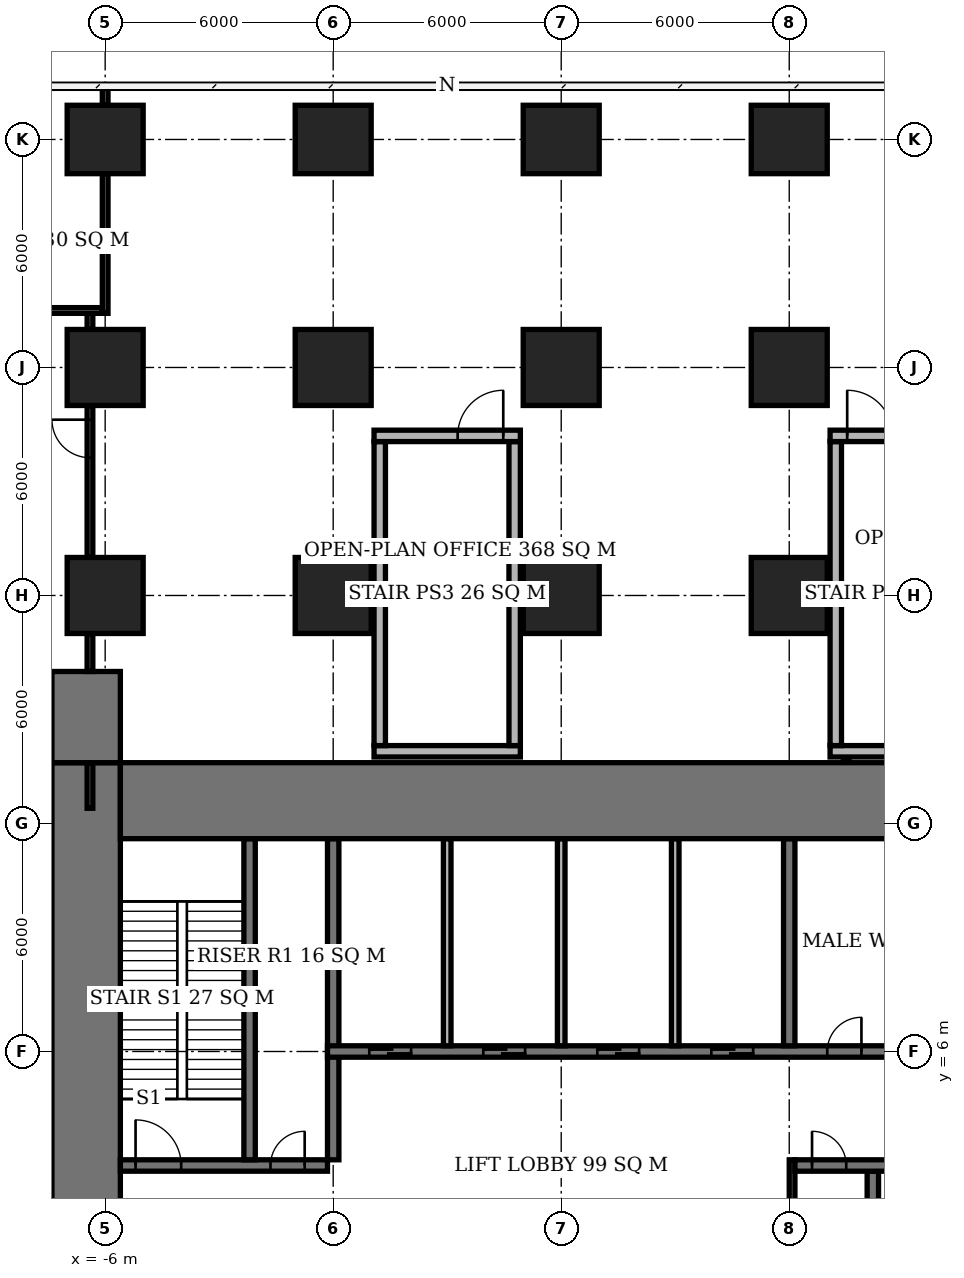
"""IFC4 building model, lengths in metres.
Left out: names, types, materials, properties, quantities, classifications, styles, units other than length and angle.
Written with IfcOpenShell. Run it as: python <this file> out.ifc"""

import sys

from ifc_helpers import new_model, si_unit, direction, frame, frame_2d, origin, origin_2d, place, context, subcontext, project, spatial, rectangle, extrude, element, fill, save


model = new_model("IFC4")
c1 = context("Model", 3, precision=1e-05, world=origin(), true_north=direction((0.0, 1.0)))
c2 = subcontext(c1, "Body", "Model", "MODEL_VIEW")
j1 = project(units=[si_unit("LENGTHUNIT", "METRE"), si_unit("PLANEANGLEUNIT", "RADIAN")], contexts=[c1])
p1 = place(None, origin())
s1 = spatial("IfcSite", under=j1, at=p1, CompositionType="ELEMENT")
p2 = place(p1, origin())
s2 = spatial("IfcBuilding", under=s1, at=p2, CompositionType="ELEMENT")
p3 = place(p2, frame((0.0, 0.0, 11.0)))
s3 = spatial("IfcBuildingStorey", under=s2, at=p3, CompositionType="ELEMENT", Elevation=11.0)
for number, where, z_axis, x_axis in (
    (1, (-6.0, 18.0, 0.0), (0.0, 0.0, 1.0), (1.0, 0.0, 0.0)),
    (2, (-6.0, 24.0, 0.0), (0.0, 0.0, 1.0), (1.0, 0.0, 0.0)),
):
    element("IfcColumn", number, at=place(p3, frame(where, z_axis=z_axis, x_axis=x_axis)), inside=s3, PredefinedType="COLUMN", context=c2, shape_type="SweptSolid", body=[
        extrude(rectangle(XDim=2.0, YDim=2.0, at=origin_2d()), origin(), (0.0, 0.0, 1.0), 7.2),
    ])
p4 = place(p3, frame((-6.0, 30.0, 0.0), z_axis=(0.0, 0.0, 1.0), x_axis=(1.0, 0.0, 0.0)))
e3 = element("IfcColumn", 3, at=p4, inside=s3, PredefinedType="COLUMN", context=c2, shape_type="SweptSolid", body=[
    extrude(rectangle(XDim=2.0, YDim=1.8, at=origin_2d()), origin(), (0.0, 0.0, 1.0), 7.2),
])
for number, where, z_axis, x_axis in (
    (4, (0.0, 18.0, 0.0), (0.0, 0.0, 1.0), (1.0, 0.0, 0.0)),
    (5, (0.0, 24.0, 0.0), (0.0, 0.0, 1.0), (1.0, 0.0, 0.0)),
):
    element("IfcColumn", number, at=place(p3, frame(where, z_axis=z_axis, x_axis=x_axis)), inside=s3, PredefinedType="COLUMN", context=c2, shape_type="SweptSolid", body=[
        extrude(rectangle(XDim=2.0, YDim=2.0, at=origin_2d()), origin(), (0.0, 0.0, 1.0), 7.2),
    ])
p5 = place(p3, frame((0.0, 30.0, 0.0), z_axis=(0.0, 0.0, 1.0), x_axis=(1.0, 0.0, 0.0)))
e6 = element("IfcColumn", 6, at=p5, inside=s3, PredefinedType="COLUMN", context=c2, shape_type="SweptSolid", body=[
    extrude(rectangle(XDim=2.0, YDim=1.8, at=origin_2d()), origin(), (0.0, 0.0, 1.0), 7.2),
])
for number, where, z_axis, x_axis in (
    (7, (6.0, 18.0, 0.0), (0.0, 0.0, 1.0), (1.0, 0.0, 0.0)),
    (8, (6.0, 24.0, 0.0), (0.0, 0.0, 1.0), (1.0, 0.0, 0.0)),
):
    element("IfcColumn", number, at=place(p3, frame(where, z_axis=z_axis, x_axis=x_axis)), inside=s3, PredefinedType="COLUMN", context=c2, shape_type="SweptSolid", body=[
        extrude(rectangle(XDim=2.0, YDim=2.0, at=origin_2d()), origin(), (0.0, 0.0, 1.0), 7.2),
    ])
p6 = place(p3, frame((6.0, 30.0, 0.0), z_axis=(0.0, 0.0, 1.0), x_axis=(1.0, 0.0, 0.0)))
e9 = element("IfcColumn", 9, at=p6, inside=s3, PredefinedType="COLUMN", context=c2, shape_type="SweptSolid", body=[
    extrude(rectangle(XDim=2.0, YDim=1.8, at=origin_2d()), origin(), (0.0, 0.0, 1.0), 7.2),
])
for number, where, z_axis, x_axis in (
    (10, (12.0, 18.0, 0.0), (0.0, 0.0, 1.0), (1.0, 0.0, 0.0)),
    (11, (12.0, 24.0, 0.0), (0.0, 0.0, 1.0), (1.0, 0.0, 0.0)),
):
    element("IfcColumn", number, at=place(p3, frame(where, z_axis=z_axis, x_axis=x_axis)), inside=s3, PredefinedType="COLUMN", context=c2, shape_type="SweptSolid", body=[
        extrude(rectangle(XDim=2.0, YDim=2.0, at=origin_2d()), origin(), (0.0, 0.0, 1.0), 7.2),
    ])
p7 = place(p3, frame((12.0, 30.0, 0.0), z_axis=(0.0, 0.0, 1.0), x_axis=(1.0, 0.0, 0.0)))
e12 = element("IfcColumn", 12, at=p7, inside=s3, PredefinedType="COLUMN", context=c2, shape_type="SweptSolid", body=[
    extrude(rectangle(XDim=2.0, YDim=1.8, at=origin_2d()), origin(), (0.0, 0.0, 1.0), 7.2),
])
p8 = place(p3, frame((-5.6, 12.6, 0.0), z_axis=(0.0, 0.0, 1.0), x_axis=(1.0, 0.0, 0.0)))
e13 = element("IfcWall", 13, at=p8, inside=s3, PredefinedType="SHEAR", context=c2, shape_type="SweptSolid", body=[
    extrude(rectangle(XDim=23.2, YDim=2.0, at=frame_2d((11.6, 0.0))), origin(), (0.0, 0.0, 1.0), 7.2),
])
p9 = place(p3, frame((-6.5, -7.6, 0.0), z_axis=(0.0, 0.0, 1.0), x_axis=(0.0, 1.0, 0.0)))
e14 = element("IfcWall", 14, at=p9, inside=s3, PredefinedType="SHEAR", context=c2, shape_type="SweptSolid", body=[
    extrude(rectangle(XDim=21.2, YDim=1.8, at=frame_2d((10.6, 0.0))), origin(), (0.0, 0.0, 1.0), 7.2),
])
p10 = place(p9, frame((7.8, 0.0, 0.0)))
e15 = element("IfcOpeningElement", 15, at=p10, cuts=e14, PredefinedType="OPENING", context=c2, shape_type="SweptSolid", body=[
    extrude(rectangle(XDim=1.8, YDim=2.4, at=frame_2d((0.9, 1.2))), frame((0.0, 0.91, 0.0), z_axis=(0.0, -1.0, 0.0), x_axis=(1.0, 0.0, 0.0)), (0.0, 0.0, 1.0), 1.82),
])
p11 = place(p3, frame((-6.5, 13.6, 0.0), z_axis=(0.0, 0.0, 1.0), x_axis=(0.0, 1.0, 0.0)))
e16 = element("IfcWall", 16, at=p11, inside=s3, PredefinedType="SHEAR", context=c2, shape_type="SweptSolid", body=[
    extrude(rectangle(XDim=2.4, YDim=1.8, at=frame_2d((1.2, 0.0))), origin(), (0.0, 0.0, 1.0), 7.2),
])
p12 = place(p3, frame((-5.6, 3.0, 0.0), z_axis=(0.0, 0.0, 1.0), x_axis=(1.0, 0.0, 0.0)))
e17 = element("IfcWall", 17, at=p12, inside=s3, PredefinedType="SHEAR", context=c2, shape_type="SweptSolid", body=[
    extrude(rectangle(XDim=5.45, YDim=0.3, at=frame_2d((2.725, 0.0))), origin(), (0.0, 0.0, 1.0), 7.2),
])
p13 = place(p12, frame((0.4, 0.0, 0.0)))
e18 = element("IfcOpeningElement", 18, at=p13, cuts=e17, PredefinedType="OPENING", context=c2, shape_type="SweptSolid", body=[
    extrude(rectangle(XDim=1.2, YDim=2.1, at=frame_2d((0.6, 1.05))), frame((0.0, 0.16, 0.0), z_axis=(0.0, -1.0, 0.0), x_axis=(1.0, 0.0, 0.0)), (0.0, 0.0, 1.0), 0.32),
])
p14 = place(p12, frame((3.95, 0.0, 0.0)))
e19 = element("IfcOpeningElement", 19, at=p14, cuts=e17, PredefinedType="OPENING", context=c2, shape_type="SweptSolid", body=[
    extrude(rectangle(XDim=0.9, YDim=2.1, at=frame_2d((0.45, 1.05))), frame((0.0, 0.16, 0.0), z_axis=(0.0, -1.0, 0.0), x_axis=(1.0, 0.0, 0.0)), (0.0, 0.0, 1.0), 0.32),
])
p15 = place(p3, frame((12.15, 3.0, 0.0), z_axis=(0.0, 0.0, 1.0), x_axis=(1.0, 0.0, 0.0)))
e20 = element("IfcWall", 20, at=p15, inside=s3, PredefinedType="SHEAR", context=c2, shape_type="SweptSolid", body=[
    extrude(rectangle(XDim=5.45, YDim=0.3, at=frame_2d((2.725, 0.0))), origin(), (0.0, 0.0, 1.0), 7.2),
])
p16 = place(p15, frame((3.25, 0.0, 0.0)))
e21 = element("IfcOpeningElement", 21, at=p16, cuts=e20, PredefinedType="OPENING", context=c2, shape_type="SweptSolid", body=[
    extrude(rectangle(XDim=1.2, YDim=2.1, at=frame_2d((0.6, 1.05))), frame((0.0, 0.16, 0.0), z_axis=(0.0, -1.0, 0.0), x_axis=(1.0, 0.0, 0.0)), (0.0, 0.0, 1.0), 0.32),
])
p17 = place(p15, frame((0.45, 0.0, 0.0)))
e22 = element("IfcOpeningElement", 22, at=p17, cuts=e20, PredefinedType="OPENING", context=c2, shape_type="SweptSolid", body=[
    extrude(rectangle(XDim=0.9, YDim=2.1, at=frame_2d((0.45, 1.05))), frame((0.0, 0.16, 0.0), z_axis=(0.0, -1.0, 0.0), x_axis=(1.0, 0.0, 0.0)), (0.0, 0.0, 1.0), 0.32),
])
p18 = place(p3, frame((-0.15, 6.0, 0.0), z_axis=(0.0, 0.0, 1.0), x_axis=(1.0, 0.0, 0.0)))
e23 = element("IfcWall", 23, at=p18, inside=s3, PredefinedType="SHEAR", context=c2, shape_type="SweptSolid", body=[
    extrude(rectangle(XDim=17.75, YDim=0.3, at=frame_2d((8.875, 0.0))), origin(), (0.0, 0.0, 1.0), 7.2),
])
p19 = place(p18, frame((13.15, 0.0, 0.0)))
e24 = element("IfcOpeningElement", 24, at=p19, cuts=e23, PredefinedType="OPENING", context=c2, shape_type="SweptSolid", body=[
    extrude(rectangle(XDim=0.9, YDim=2.1, at=frame_2d((0.45, 1.05))), frame((0.0, 0.16, 0.0), z_axis=(0.0, -1.0, 0.0), x_axis=(1.0, 0.0, 0.0)), (0.0, 0.0, 1.0), 0.32),
])
p20 = place(p18, frame((1.1, 0.0, 0.0)))
e25 = element("IfcOpeningElement", 25, at=p20, cuts=e23, PredefinedType="OPENING", context=c2, shape_type="SweptSolid", body=[
    extrude(rectangle(XDim=1.1, YDim=2.1, at=frame_2d((0.55, 1.05))), frame((0.0, 0.16, 0.0), z_axis=(0.0, -1.0, 0.0), x_axis=(1.0, 0.0, 0.0)), (0.0, 0.0, 1.0), 0.32),
])
p21 = place(p18, frame((4.1, 0.0, 0.0)))
e26 = element("IfcOpeningElement", 26, at=p21, cuts=e23, PredefinedType="OPENING", context=c2, shape_type="SweptSolid", body=[
    extrude(rectangle(XDim=1.1, YDim=2.1, at=frame_2d((0.55, 1.05))), frame((0.0, 0.16, 0.0), z_axis=(0.0, -1.0, 0.0), x_axis=(1.0, 0.0, 0.0)), (0.0, 0.0, 1.0), 0.32),
])
p22 = place(p18, frame((7.1, 0.0, 0.0)))
e27 = element("IfcOpeningElement", 27, at=p22, cuts=e23, PredefinedType="OPENING", context=c2, shape_type="SweptSolid", body=[
    extrude(rectangle(XDim=1.1, YDim=2.1, at=frame_2d((0.55, 1.05))), frame((0.0, 0.16, 0.0), z_axis=(0.0, -1.0, 0.0), x_axis=(1.0, 0.0, 0.0)), (0.0, 0.0, 1.0), 0.32),
])
p23 = place(p18, frame((10.1, 0.0, 0.0)))
e28 = element("IfcOpeningElement", 28, at=p23, cuts=e23, PredefinedType="OPENING", context=c2, shape_type="SweptSolid", body=[
    extrude(rectangle(XDim=1.1, YDim=2.1, at=frame_2d((0.55, 1.05))), frame((0.0, 0.16, 0.0), z_axis=(0.0, -1.0, 0.0), x_axis=(1.0, 0.0, 0.0)), (0.0, 0.0, 1.0), 0.32),
])
p24 = place(p3, frame((0.0, 3.15, 0.0), z_axis=(0.0, 0.0, 1.0), x_axis=(0.0, 1.0, 0.0)))
e29 = element("IfcWall", 29, at=p24, inside=s3, PredefinedType="SHEAR", context=c2, shape_type="SweptSolid", body=[
    extrude(rectangle(XDim=8.45, YDim=0.3, at=frame_2d((4.225, 0.0))), origin(), (0.0, 0.0, 1.0), 7.2),
])
p25 = place(p3, frame((12.0, 6.15, 0.0), z_axis=(0.0, 0.0, 1.0), x_axis=(0.0, 1.0, 0.0)))
e30 = element("IfcWall", 30, at=p25, inside=s3, PredefinedType="SHEAR", context=c2, shape_type="SweptSolid", body=[
    extrude(rectangle(XDim=5.45, YDim=0.3, at=frame_2d((2.725, 0.0))), origin(), (0.0, 0.0, 1.0), 7.2),
])
for number, where, z_axis, x_axis in (
    (31, (-2.2, 3.15, 0.0), (0.0, 0.0, 1.0), (0.0, 1.0, 0.0)),
    (32, (14.2, -5.6, 0.0), (0.0, 0.0, 1.0), (0.0, 1.0, 0.0)),
):
    element("IfcWall", number, at=place(p3, frame(where, z_axis=z_axis, x_axis=x_axis)), inside=s3, PredefinedType="SHEAR", context=c2, shape_type="SweptSolid", body=[
        extrude(rectangle(XDim=8.45, YDim=0.3, at=frame_2d((4.225, 0.0))), origin(), (0.0, 0.0, 1.0), 7.2),
    ])
for number, where, z_axis, x_axis in (
    (33, (3.0, 6.15, 0.0), (0.0, 0.0, 1.0), (0.0, 1.0, 0.0)),
    (34, (6.0, 6.15, 0.0), (0.0, 0.0, 1.0), (0.0, 1.0, 0.0)),
    (35, (9.0, 6.15, 0.0), (0.0, 0.0, 1.0), (0.0, 1.0, 0.0)),
):
    element("IfcWall", number, at=place(p3, frame(where, z_axis=z_axis, x_axis=x_axis)), inside=s3, PredefinedType="SOLIDWALL", context=c2, shape_type="SweptSolid", body=[
        extrude(rectangle(XDim=5.45, YDim=0.2, at=frame_2d((2.725, 0.0))), origin(), (0.0, 0.0, 1.0), 7.2),
    ])
p26 = place(p3, frame((13.075, 13.9, 0.0), z_axis=(0.0, 0.0, 1.0), x_axis=(1.0, 0.0, 0.0)))
e36 = element("IfcWall", 36, at=p26, inside=s3, PredefinedType="PARTITIONING", context=c2, shape_type="SweptSolid", body=[
    extrude(rectangle(XDim=3.85, YDim=0.3, at=frame_2d((1.925, 0.0))), origin(), (0.0, 0.0, 1.0), 6.95),
])
p27 = place(p3, frame((13.075, 22.2, 0.0), z_axis=(0.0, 0.0, 1.0), x_axis=(1.0, 0.0, 0.0)))
e37 = element("IfcWall", 37, at=p27, inside=s3, PredefinedType="PARTITIONING", context=c2, shape_type="SweptSolid", body=[
    extrude(rectangle(XDim=3.85, YDim=0.3, at=frame_2d((1.925, 0.0))), origin(), (0.0, 0.0, 1.0), 6.95),
])
p28 = place(p27, frame((0.45, 0.0, 0.0)))
e38 = element("IfcOpeningElement", 38, at=p28, cuts=e37, PredefinedType="OPENING", context=c2, shape_type="SweptSolid", body=[
    extrude(rectangle(XDim=1.2, YDim=2.1, at=frame_2d((0.6, 1.05))), frame((0.0, 0.16, 0.0), z_axis=(0.0, -1.0, 0.0), x_axis=(1.0, 0.0, 0.0)), (0.0, 0.0, 1.0), 0.32),
])
p29 = place(p3, frame((13.225, 14.05, 0.0), z_axis=(0.0, 0.0, 1.0), x_axis=(0.0, 1.0, 0.0)))
e39 = element("IfcWall", 39, at=p29, inside=s3, PredefinedType="PARTITIONING", context=c2, shape_type="SweptSolid", body=[
    extrude(rectangle(XDim=8.0, YDim=0.3, at=frame_2d((4.0, 0.0))), origin(), (0.0, 0.0, 1.0), 6.95),
])
p30 = place(p3, frame((1.075, 13.9, 0.0), z_axis=(0.0, 0.0, 1.0), x_axis=(1.0, 0.0, 0.0)))
e40 = element("IfcWall", 40, at=p30, inside=s3, PredefinedType="PARTITIONING", context=c2, shape_type="SweptSolid", body=[
    extrude(rectangle(XDim=3.85, YDim=0.3, at=frame_2d((1.925, 0.0))), origin(), (0.0, 0.0, 1.0), 6.95),
])
p31 = place(p3, frame((1.075, 22.2, 0.0), z_axis=(0.0, 0.0, 1.0), x_axis=(1.0, 0.0, 0.0)))
e41 = element("IfcWall", 41, at=p31, inside=s3, PredefinedType="PARTITIONING", context=c2, shape_type="SweptSolid", body=[
    extrude(rectangle(XDim=3.85, YDim=0.3, at=frame_2d((1.925, 0.0))), origin(), (0.0, 0.0, 1.0), 6.95),
])
p32 = place(p31, frame((2.2, 0.0, 0.0)))
e42 = element("IfcOpeningElement", 42, at=p32, cuts=e41, PredefinedType="OPENING", context=c2, shape_type="SweptSolid", body=[
    extrude(rectangle(XDim=1.2, YDim=2.1, at=frame_2d((0.6, 1.05))), frame((0.0, 0.16, 0.0), z_axis=(0.0, -1.0, 0.0), x_axis=(1.0, 0.0, 0.0)), (0.0, 0.0, 1.0), 0.32),
])
for number, where, z_axis, x_axis in (
    (43, (1.225, 14.05, 0.0), (0.0, 0.0, 1.0), (0.0, 1.0, 0.0)),
    (44, (4.775, 14.05, 0.0), (0.0, 0.0, 1.0), (0.0, 1.0, 0.0)),
):
    element("IfcWall", number, at=place(p3, frame(where, z_axis=z_axis, x_axis=x_axis)), inside=s3, PredefinedType="PARTITIONING", context=c2, shape_type="SweptSolid", body=[
        extrude(rectangle(XDim=8.0, YDim=0.3, at=frame_2d((4.0, 0.0))), origin(), (0.0, 0.0, 1.0), 6.95),
    ])
p33 = place(p3, frame((-11.925, 25.5, 0.0), z_axis=(0.0, 0.0, 1.0), x_axis=(1.0, 0.0, 0.0)))
e45 = element("IfcWall", 45, at=p33, inside=s3, PredefinedType="PARTITIONING", context=c2, shape_type="SweptSolid", body=[
    extrude(rectangle(XDim=5.85, YDim=0.15, at=frame_2d((2.925, 0.0))), origin(), (0.0, 0.0, 1.0), 6.8),
])
p34 = place(p33, frame((2.325, 0.0, 0.0)))
e46 = element("IfcOpeningElement", 46, at=p34, cuts=e45, PredefinedType="OPENING", context=c2, shape_type="SweptSolid", body=[
    extrude(rectangle(XDim=1.0, YDim=2.1, at=frame_2d((0.5, 1.05))), frame((0.0, 0.085, 0.0), z_axis=(0.0, -1.0, 0.0), x_axis=(1.0, 0.0, 0.0)), (0.0, 0.0, 1.0), 0.17),
])
p35 = place(p3, frame((-6.0, 25.425, 0.0), z_axis=(0.0, 0.0, 1.0), x_axis=(0.0, 1.0, 0.0)))
e47 = element("IfcWall", 47, at=p35, inside=s3, PredefinedType="PARTITIONING", context=c2, shape_type="SweptSolid", body=[
    extrude(rectangle(XDim=3.675, YDim=0.15, at=frame_2d((1.837, 0.0))), origin(), (0.0, 0.0, 1.0), 6.8),
])
p36 = place(p3, frame((-6.0, 30.9, 0.0), z_axis=(0.0, 0.0, 1.0), x_axis=(0.0, 1.0, 0.0)))
e48 = element("IfcWall", 48, at=p36, inside=s3, PredefinedType="PARTITIONING", context=c2, shape_type="SweptSolid", body=[
    extrude(rectangle(XDim=0.475, YDim=0.15, at=frame_2d((0.238, 0.0))), origin(), (0.0, 0.0, 1.0), 6.8),
])
p37 = place(p3, frame((-6.4, 12.4, 0.0), z_axis=(0.0, 0.0, 1.0), x_axis=(0.0, 1.0, 0.0)))
e49 = element("IfcWall", 49, at=p37, inside=s3, PredefinedType="PARTITIONING", context=c2, shape_type="SweptSolid", body=[
    extrude(rectangle(XDim=1.2, YDim=0.15, at=frame_2d((0.6, 0.0))), origin(), (0.0, 0.0, 1.0), 6.95),
])
p38 = place(p3, frame((-6.4, 16.0, 0.0), z_axis=(0.0, 0.0, 1.0), x_axis=(0.0, 1.0, 0.0)))
e50 = element("IfcWall", 50, at=p38, inside=s3, PredefinedType="PARTITIONING", context=c2, shape_type="SweptSolid", body=[
    extrude(rectangle(XDim=1.0, YDim=0.15, at=frame_2d((0.5, 0.0))), origin(), (0.0, 0.0, 1.0), 6.95),
])
p39 = place(p3, frame((-6.4, 19.0, 0.0), z_axis=(0.0, 0.0, 1.0), x_axis=(0.0, 1.0, 0.0)))
e51 = element("IfcWall", 51, at=p39, inside=s3, PredefinedType="PARTITIONING", context=c2, shape_type="SweptSolid", body=[
    extrude(rectangle(XDim=4.0, YDim=0.15, at=frame_2d((2.0, 0.0))), origin(), (0.0, 0.0, 1.0), 6.95),
])
p40 = place(p39, frame((2.626, 0.0, 0.0)))
e52 = element("IfcOpeningElement", 52, at=p40, cuts=e51, PredefinedType="OPENING", context=c2, shape_type="SweptSolid", body=[
    extrude(rectangle(XDim=1.0, YDim=2.1, at=frame_2d((0.5, 1.05))), frame((0.0, 0.085, 0.0), z_axis=(0.0, -1.0, 0.0), x_axis=(1.0, 0.0, 0.0)), (0.0, 0.0, 1.0), 0.17),
])
p41 = place(p3, frame((-6.4, 25.0, 0.0), z_axis=(0.0, 0.0, 1.0), x_axis=(0.0, 1.0, 0.0)))
e53 = element("IfcWall", 53, at=p41, inside=s3, PredefinedType="PARTITIONING", context=c2, shape_type="SweptSolid", body=[
    extrude(rectangle(XDim=0.425, YDim=0.15, at=frame_2d((0.212, 0.0))), origin(), (0.0, 0.0, 1.0), 6.95),
])
p42 = place(p3, frame((13.5, 12.4, 0.0), z_axis=(0.0, 0.0, 1.0), x_axis=(0.0, 1.0, 0.0)))
e54 = element("IfcWall", 54, at=p42, inside=s3, PredefinedType="PARTITIONING", context=c2, shape_type="SweptSolid", body=[
    extrude(rectangle(XDim=1.35, YDim=0.15, at=frame_2d((0.675, 0.0))), origin(), (0.0, 0.0, 1.0), 6.95),
])
p43 = place(p3, frame((12.075, 0.15, 0.0), z_axis=(0.0, 0.0, 1.0), x_axis=(0.0, 1.0, 0.0)))
e55 = element("IfcWall", 55, at=p43, inside=s3, PredefinedType="PARTITIONING", context=c2, shape_type="SweptSolid", body=[
    extrude(rectangle(XDim=3.0, YDim=0.15, at=frame_2d((1.5, 0.0))), origin(), (0.0, 0.0, 1.0), 6.95),
])
p44 = place(p13, origin())
e56 = element("IfcDoor", 56, at=p44, inside=s3, OperationType="SINGLE_SWING_LEFT", PredefinedType="DOOR", context=c2, shape_type="SweptSolid", body=[
    extrude(rectangle(XDim=1.2, YDim=2.1, at=frame_2d((0.6, 1.05))), frame((0.0, 0.025, 0.0), z_axis=(0.0, -1.0, 0.0), x_axis=(1.0, 0.0, 0.0)), (0.0, 0.0, 1.0), 0.05),
])
fill(e18, e56)
p45 = place(p14, origin())
e57 = element("IfcDoor", 57, at=p45, inside=s3, OperationType="SINGLE_SWING_RIGHT", PredefinedType="DOOR", context=c2, shape_type="SweptSolid", body=[
    extrude(rectangle(XDim=0.9, YDim=2.1, at=frame_2d((0.45, 1.05))), frame((0.0, 0.025, 0.0), z_axis=(0.0, -1.0, 0.0), x_axis=(1.0, 0.0, 0.0)), (0.0, 0.0, 1.0), 0.05),
])
fill(e19, e57)
p46 = place(p17, origin())
e58 = element("IfcDoor", 58, at=p46, inside=s3, OperationType="SINGLE_SWING_LEFT", PredefinedType="DOOR", context=c2, shape_type="SweptSolid", body=[
    extrude(rectangle(XDim=0.9, YDim=2.1, at=frame_2d((0.45, 1.05))), frame((0.0, 0.025, 0.0), z_axis=(0.0, -1.0, 0.0), x_axis=(1.0, 0.0, 0.0)), (0.0, 0.0, 1.0), 0.05),
])
fill(e22, e58)
p47 = place(p19, origin())
e59 = element("IfcDoor", 59, at=p47, inside=s3, OperationType="SINGLE_SWING_RIGHT", PredefinedType="DOOR", context=c2, shape_type="SweptSolid", body=[
    extrude(rectangle(XDim=0.9, YDim=2.1, at=frame_2d((0.45, 1.05))), frame((0.0, 0.025, 0.0), z_axis=(0.0, -1.0, 0.0), x_axis=(1.0, 0.0, 0.0)), (0.0, 0.0, 1.0), 0.05),
])
fill(e24, e59)
p48 = place(p20, origin())
e60 = element("IfcDoor", 60, at=p48, inside=s3, OperationType="DOUBLE_DOOR_SLIDING", PredefinedType="USERDEFINED", context=c2, shape_type="SweptSolid", body=[
    extrude(rectangle(XDim=1.1, YDim=2.1, at=frame_2d((0.55, 1.05))), frame((0.0, 0.025, 0.0), z_axis=(0.0, -1.0, 0.0), x_axis=(1.0, 0.0, 0.0)), (0.0, 0.0, 1.0), 0.05),
])
fill(e25, e60)
p49 = place(p21, origin())
e61 = element("IfcDoor", 61, at=p49, inside=s3, OperationType="DOUBLE_DOOR_SLIDING", PredefinedType="USERDEFINED", context=c2, shape_type="SweptSolid", body=[
    extrude(rectangle(XDim=1.1, YDim=2.1, at=frame_2d((0.55, 1.05))), frame((0.0, 0.025, 0.0), z_axis=(0.0, -1.0, 0.0), x_axis=(1.0, 0.0, 0.0)), (0.0, 0.0, 1.0), 0.05),
])
fill(e26, e61)
p50 = place(p22, origin())
e62 = element("IfcDoor", 62, at=p50, inside=s3, OperationType="DOUBLE_DOOR_SLIDING", PredefinedType="USERDEFINED", context=c2, shape_type="SweptSolid", body=[
    extrude(rectangle(XDim=1.1, YDim=2.1, at=frame_2d((0.55, 1.05))), frame((0.0, 0.025, 0.0), z_axis=(0.0, -1.0, 0.0), x_axis=(1.0, 0.0, 0.0)), (0.0, 0.0, 1.0), 0.05),
])
fill(e27, e62)
p51 = place(p23, origin())
e63 = element("IfcDoor", 63, at=p51, inside=s3, OperationType="DOUBLE_DOOR_SLIDING", PredefinedType="USERDEFINED", context=c2, shape_type="SweptSolid", body=[
    extrude(rectangle(XDim=1.1, YDim=2.1, at=frame_2d((0.55, 1.05))), frame((0.0, 0.025, 0.0), z_axis=(0.0, -1.0, 0.0), x_axis=(1.0, 0.0, 0.0)), (0.0, 0.0, 1.0), 0.05),
])
fill(e28, e63)
p52 = place(p28, origin())
e64 = element("IfcDoor", 64, at=p52, inside=s3, OperationType="SINGLE_SWING_LEFT", PredefinedType="DOOR", context=c2, shape_type="SweptSolid", body=[
    extrude(rectangle(XDim=1.2, YDim=2.1, at=frame_2d((0.6, 1.05))), frame((0.0, 0.025, 0.0), z_axis=(0.0, -1.0, 0.0), x_axis=(1.0, 0.0, 0.0)), (0.0, 0.0, 1.0), 0.05),
])
fill(e38, e64)
p53 = place(p32, origin())
e65 = element("IfcDoor", 65, at=p53, inside=s3, OperationType="SINGLE_SWING_RIGHT", PredefinedType="DOOR", context=c2, shape_type="SweptSolid", body=[
    extrude(rectangle(XDim=1.2, YDim=2.1, at=frame_2d((0.6, 1.05))), frame((0.0, 0.025, 0.0), z_axis=(0.0, -1.0, 0.0), x_axis=(1.0, 0.0, 0.0)), (0.0, 0.0, 1.0), 0.05),
])
fill(e42, e65)
p54 = place(p40, origin())
e66 = element("IfcDoor", 66, at=p54, inside=s3, OperationType="SINGLE_SWING_RIGHT", PredefinedType="DOOR", context=c2, shape_type="SweptSolid", body=[
    extrude(rectangle(XDim=1.0, YDim=2.1, at=frame_2d((0.5, 1.05))), frame((0.0, 0.025, 0.0), z_axis=(0.0, -1.0, 0.0), x_axis=(1.0, 0.0, 0.0)), (0.0, 0.0, 1.0), 0.05),
])
fill(e52, e66)
save(model, sys.argv[1])
